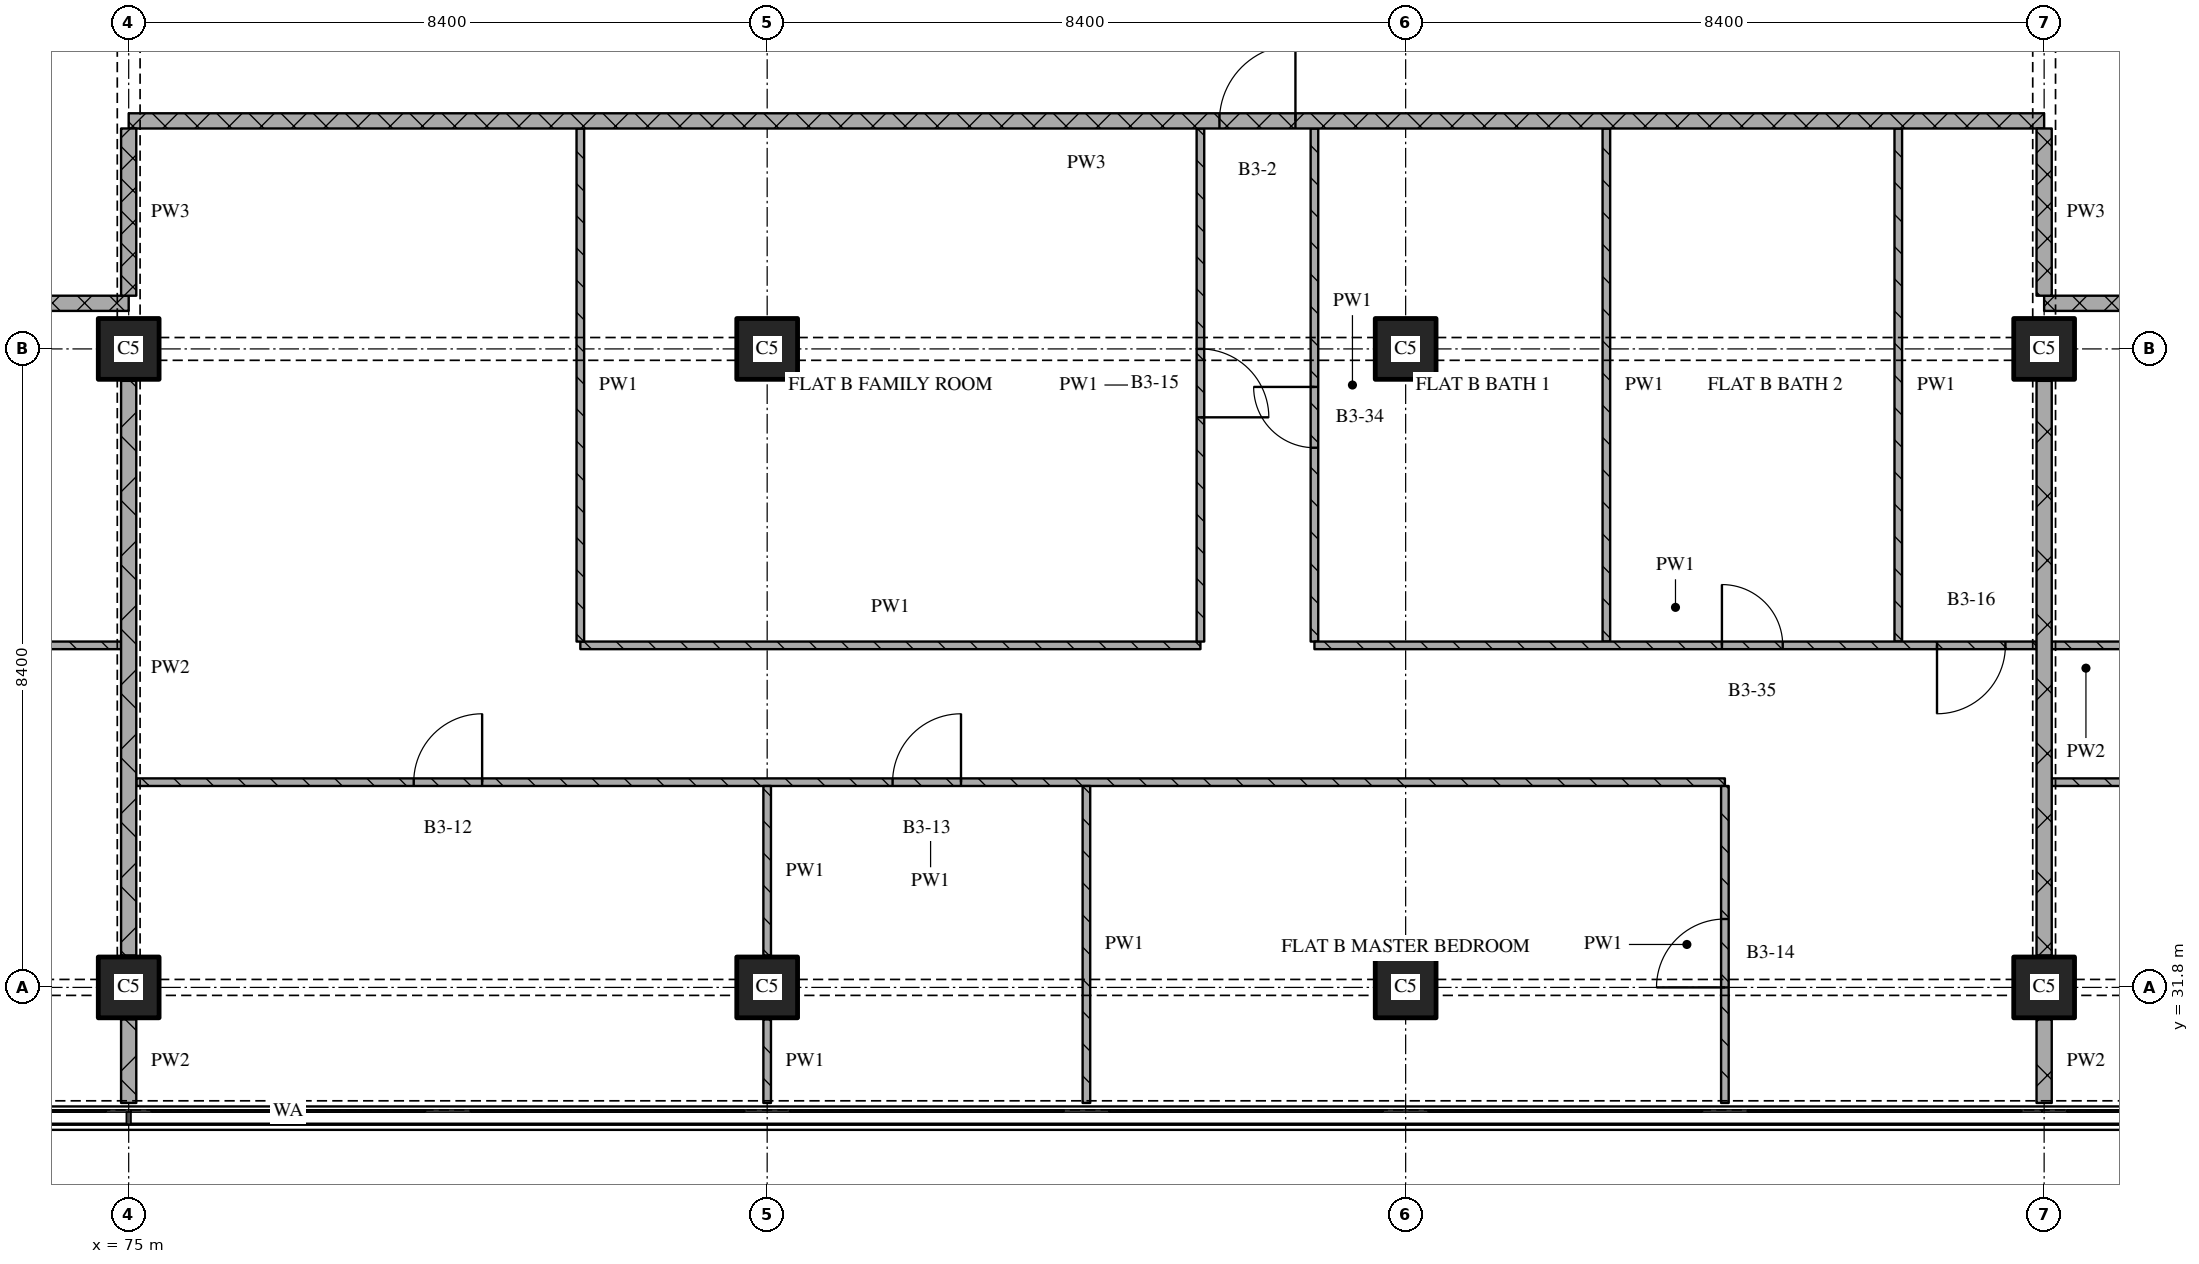
"""IFC4 building model, lengths in metres.
Left out: names, types, materials, properties, quantities, classifications, styles, units other than length and angle.
Written with IfcOpenShell. Run it as: python <this file> out.ifc"""

import sys

from ifc_helpers import new_model, si_unit, direction, frame, frame_2d, origin, origin_2d, place, context, subcontext, project, spatial, rectangle, extrude, element, fill, save


model = new_model("IFC4")
c1 = context("Model", 3, precision=1e-05, world=origin(), true_north=direction((0.0, 1.0)))
c2 = subcontext(c1, "Body", "Model", "MODEL_VIEW")
j1 = project(units=[si_unit("LENGTHUNIT", "METRE"), si_unit("PLANEANGLEUNIT", "RADIAN")], contexts=[c1])
p1 = place(None, origin())
s1 = spatial("IfcSite", under=j1, at=p1, CompositionType="ELEMENT")
p2 = place(p1, origin())
s2 = spatial("IfcBuilding", under=s1, at=p2, CompositionType="ELEMENT")
p3 = place(p2, frame((0.0, 0.0, 120.45)))
s3 = spatial("IfcBuildingStorey", under=s2, at=p3, CompositionType="ELEMENT", Elevation=120.45)
for number, where, z_axis, x_axis in (
    (1, (75.0, 31.8, 0.0), (0.0, 0.0, 1.0), (1.0, 0.0, 0.0)),
    (2, (75.0, 40.2, 0.0), (0.0, 0.0, 1.0), (1.0, 0.0, 0.0)),
    (3, (83.4, 31.8, 0.0), (0.0, 0.0, 1.0), (1.0, 0.0, 0.0)),
    (4, (83.4, 40.2, 0.0), (0.0, 0.0, 1.0), (1.0, 0.0, 0.0)),
    (5, (91.8, 31.8, 0.0), (0.0, 0.0, 1.0), (1.0, 0.0, 0.0)),
    (6, (91.8, 40.2, 0.0), (0.0, 0.0, 1.0), (1.0, 0.0, 0.0)),
    (7, (100.2, 31.8, 0.0), (0.0, 0.0, 1.0), (1.0, 0.0, 0.0)),
    (8, (100.2, 40.2, 0.0), (0.0, 0.0, 1.0), (1.0, 0.0, 0.0)),
):
    element("IfcColumn", number, at=place(p3, frame(where, z_axis=z_axis, x_axis=x_axis)), inside=s3, PredefinedType="COLUMN", context=c2, shape_type="SweptSolid", body=[
        extrude(rectangle(XDim=0.8, YDim=0.8, at=origin_2d()), origin(), (0.0, 0.0, 1.0), 3.6),
    ])
p4 = place(p3, frame((96.0, 34.5, 0.0), z_axis=(0.0, 0.0, 1.0), x_axis=(-1.0, 0.0, 0.0)))
e9 = element("IfcWall", 9, at=p4, inside=s3, PredefinedType="PARTITIONING", context=c2, shape_type="SweptSolid", body=[
    extrude(rectangle(XDim=20.9, YDim=0.1, at=frame_2d((10.45, 0.0))), origin(), (0.0, 0.0, 1.0), 3.32),
])
p5 = place(p4, frame((10.05, 0.0, 0.0)))
e10 = element("IfcOpeningElement", 10, at=p5, cuts=e9, PredefinedType="OPENING", context=c2, shape_type="SweptSolid", body=[
    extrude(rectangle(XDim=0.9, YDim=2.1, at=frame_2d((0.45, 1.05))), frame((0.0, 0.06, 0.0), z_axis=(0.0, -1.0, 0.0), x_axis=(1.0, 0.0, 0.0)), (0.0, 0.0, 1.0), 0.12),
])
p6 = place(p4, frame((16.35, 0.0, 0.0)))
e11 = element("IfcOpeningElement", 11, at=p6, cuts=e9, PredefinedType="OPENING", context=c2, shape_type="SweptSolid", body=[
    extrude(rectangle(XDim=0.9, YDim=2.1, at=frame_2d((0.45, 1.05))), frame((0.0, 0.06, 0.0), z_axis=(0.0, -1.0, 0.0), x_axis=(1.0, 0.0, 0.0)), (0.0, 0.0, 1.0), 0.12),
])
p7 = place(p3, frame((112.8, 34.5, 0.0), z_axis=(0.0, 0.0, 1.0), x_axis=(-1.0, 0.0, 0.0)))
e12 = element("IfcWall", 12, at=p7, inside=s3, PredefinedType="PARTITIONING", context=c2, shape_type="SweptSolid", body=[
    extrude(rectangle(XDim=12.5, YDim=0.1, at=frame_2d((6.25, 0.0))), origin(), (0.0, 0.0, 1.0), 3.32),
])
p8 = place(p7, frame((7.95, 0.0, 0.0)))
e13 = element("IfcOpeningElement", 13, at=p8, cuts=e12, PredefinedType="OPENING", context=c2, shape_type="SweptSolid", body=[
    extrude(rectangle(XDim=0.9, YDim=2.1, at=frame_2d((0.45, 1.05))), frame((0.0, 0.06, 0.0), z_axis=(0.0, -1.0, 0.0), x_axis=(1.0, 0.0, 0.0)), (0.0, 0.0, 1.0), 0.12),
])
p9 = place(p3, frame((64.8, 36.3, 0.0), z_axis=(0.0, 0.0, 1.0), x_axis=(1.0, 0.0, 0.0)))
e14 = element("IfcWall", 14, at=p9, inside=s3, PredefinedType="PARTITIONING", context=c2, shape_type="SweptSolid", body=[
    extrude(rectangle(XDim=10.1, YDim=0.1, at=frame_2d((5.05, 0.0))), origin(), (0.0, 0.0, 1.0), 3.32),
])
p10 = place(p9, frame((6.95, 0.0, 0.0)))
e15 = element("IfcOpeningElement", 15, at=p10, cuts=e14, PredefinedType="OPENING", context=c2, shape_type="SweptSolid", body=[
    extrude(rectangle(XDim=0.8, YDim=2.1, at=frame_2d((0.4, 1.05))), frame((0.0, 0.06, 0.0), z_axis=(0.0, -1.0, 0.0), x_axis=(1.0, 0.0, 0.0)), (0.0, 0.0, 1.0), 0.12),
])
p11 = place(p3, frame((80.942, 36.3, 0.0), z_axis=(0.0, 0.0, 1.0), x_axis=(1.0, 0.0, 0.0)))
e16 = element("IfcWall", 16, at=p11, inside=s3, PredefinedType="PARTITIONING", context=c2, shape_type="SweptSolid", body=[
    extrude(rectangle(XDim=8.158, YDim=0.1, at=frame_2d((4.079, 0.0))), origin(), (0.0, 0.0, 1.0), 3.32),
])
p12 = place(p3, frame((75.0, 40.8, 0.0), z_axis=(0.0, 0.0, 1.0), x_axis=(-1.0, 0.0, 0.0)))
e17 = element("IfcWall", 17, at=p12, inside=s3, PredefinedType="PARTITIONING", context=c2, shape_type="SweptSolid", body=[
    extrude(rectangle(XDim=24.18, YDim=0.2, at=frame_2d((12.09, 0.0))), origin(), (0.0, 0.0, 1.0), 3.32),
])
p13 = place(p12, frame((10.45, 0.0, 0.0)))
e18 = element("IfcOpeningElement", 18, at=p13, cuts=e17, PredefinedType="OPENING", context=c2, shape_type="SweptSolid", body=[
    extrude(rectangle(XDim=1.0, YDim=2.1, at=frame_2d((0.5, 1.05))), frame((0.0, 0.11, 0.0), z_axis=(0.0, -1.0, 0.0), x_axis=(1.0, 0.0, 0.0)), (0.0, 0.0, 1.0), 0.22),
])
p14 = place(p3, frame((124.38, 40.8, 0.0), z_axis=(0.0, 0.0, 1.0), x_axis=(-1.0, 0.0, 0.0)))
e19 = element("IfcWall", 19, at=p14, inside=s3, PredefinedType="PARTITIONING", context=c2, shape_type="SweptSolid", body=[
    extrude(rectangle(XDim=24.18, YDim=0.2, at=frame_2d((12.09, 0.0))), origin(), (0.0, 0.0, 1.0), 3.32),
])
p15 = place(p14, frame((16.33, 0.0, 0.0)))
e20 = element("IfcOpeningElement", 20, at=p15, cuts=e19, PredefinedType="OPENING", context=c2, shape_type="SweptSolid", body=[
    extrude(rectangle(XDim=1.0, YDim=2.1, at=frame_2d((0.5, 1.05))), frame((0.0, 0.11, 0.0), z_axis=(0.0, -1.0, 0.0), x_axis=(1.0, 0.0, 0.0)), (0.0, 0.0, 1.0), 0.22),
])
p16 = place(p3, frame((100.2, 43.2, 0.0), z_axis=(0.0, 0.0, 1.0), x_axis=(-1.0, 0.0, 0.0)))
e21 = element("IfcWall", 21, at=p16, inside=s3, PredefinedType="PARTITIONING", context=c2, shape_type="SweptSolid", body=[
    extrude(rectangle(XDim=25.2, YDim=0.2, at=frame_2d((12.6, 0.0))), origin(), (0.0, 0.0, 1.0), 3.32),
])
p17 = place(p16, frame((9.85, 0.0, 0.0)))
e22 = element("IfcOpeningElement", 22, at=p17, cuts=e21, PredefinedType="OPENING", context=c2, shape_type="SweptSolid", body=[
    extrude(rectangle(XDim=1.0, YDim=2.1, at=frame_2d((0.5, 1.05))), frame((0.0, 0.11, 0.0), z_axis=(0.0, -1.0, 0.0), x_axis=(1.0, 0.0, 0.0)), (0.0, 0.0, 1.0), 0.22),
])
p18 = place(p3, frame((75.0, 43.1, 0.0), z_axis=(0.0, 0.0, 1.0), x_axis=(0.0, -1.0, 0.0)))
e23 = element("IfcWall", 23, at=p18, inside=s3, PredefinedType="PARTITIONING", context=c2, shape_type="SweptSolid", body=[
    extrude(rectangle(XDim=2.2, YDim=0.2, at=frame_2d((1.1, 0.0))), origin(), (0.0, 0.0, 1.0), 2.43),
])
p19 = place(p3, frame((75.0, 31.38, 0.0), z_axis=(0.0, 0.0, 1.0), x_axis=(0.0, -1.0, 0.0)))
e24 = element("IfcWall", 24, at=p19, inside=s3, PredefinedType="PARTITIONING", context=c2, shape_type="SweptSolid", body=[
    extrude(rectangle(XDim=1.1, YDim=0.2, at=frame_2d((0.55, 0.0))), origin(), (0.0, 0.0, 1.0), 3.32),
])
p20 = place(p3, frame((75.0, 39.78, 0.0), z_axis=(0.0, 0.0, 1.0), x_axis=(0.0, -1.0, 0.0)))
e25 = element("IfcWall", 25, at=p20, inside=s3, PredefinedType="PARTITIONING", context=c2, shape_type="SweptSolid", body=[
    extrude(rectangle(XDim=7.56, YDim=0.2, at=frame_2d((3.78, 0.0))), origin(), (0.0, 0.0, 1.0), 2.83),
])
p21 = place(p3, frame((80.942, 43.1, 0.0), z_axis=(0.0, 0.0, 1.0), x_axis=(0.0, -1.0, 0.0)))
e26 = element("IfcWall", 26, at=p21, inside=s3, PredefinedType="PARTITIONING", context=c2, shape_type="SweptSolid", body=[
    extrude(rectangle(XDim=6.75, YDim=0.1, at=frame_2d((3.375, 0.0))), origin(), (0.0, 0.0, 1.0), 3.32),
])
p22 = place(p3, frame((83.4, 31.38, 0.0), z_axis=(0.0, 0.0, 1.0), x_axis=(0.0, -1.0, 0.0)))
e27 = element("IfcWall", 27, at=p22, inside=s3, PredefinedType="PARTITIONING", context=c2, shape_type="SweptSolid", body=[
    extrude(rectangle(XDim=1.1, YDim=0.1, at=frame_2d((0.55, 0.0))), origin(), (0.0, 0.0, 1.0), 3.32),
])
p23 = place(p3, frame((83.4, 34.45, 0.0), z_axis=(0.0, 0.0, 1.0), x_axis=(0.0, -1.0, 0.0)))
e28 = element("IfcWall", 28, at=p23, inside=s3, PredefinedType="PARTITIONING", context=c2, shape_type="SweptSolid", body=[
    extrude(rectangle(XDim=2.23, YDim=0.1, at=frame_2d((1.115, 0.0))), origin(), (0.0, 0.0, 1.0), 3.32),
])
p24 = place(p3, frame((87.6, 34.45, 0.0), z_axis=(0.0, 0.0, 1.0), x_axis=(0.0, -1.0, 0.0)))
e29 = element("IfcWall", 29, at=p24, inside=s3, PredefinedType="PARTITIONING", context=c2, shape_type="SweptSolid", body=[
    extrude(rectangle(XDim=4.17, YDim=0.1, at=frame_2d((2.085, 0.0))), origin(), (0.0, 0.0, 1.0), 3.32),
])
p25 = place(p3, frame((89.1, 36.35, 0.0), z_axis=(0.0, 0.0, 1.0), x_axis=(0.0, 1.0, 0.0)))
e30 = element("IfcWall", 30, at=p25, inside=s3, PredefinedType="PARTITIONING", context=c2, shape_type="SweptSolid", body=[
    extrude(rectangle(XDim=6.75, YDim=0.1, at=frame_2d((3.375, 0.0))), origin(), (0.0, 0.0, 1.0), 3.32),
])
p26 = place(p25, frame((2.95, 0.0, 0.0)))
e31 = element("IfcOpeningElement", 31, at=p26, cuts=e30, PredefinedType="OPENING", context=c2, shape_type="SweptSolid", body=[
    extrude(rectangle(XDim=0.9, YDim=2.1, at=frame_2d((0.45, 1.05))), frame((0.0, 0.06, 0.0), z_axis=(0.0, -1.0, 0.0), x_axis=(1.0, 0.0, 0.0)), (0.0, 0.0, 1.0), 0.12),
])
p27 = place(p3, frame((90.6, 43.1, 0.0), z_axis=(0.0, 0.0, 1.0), x_axis=(0.0, -1.0, 0.0)))
e32 = element("IfcWall", 32, at=p27, inside=s3, PredefinedType="PARTITIONING", context=c2, shape_type="SweptSolid", body=[
    extrude(rectangle(XDim=6.75, YDim=0.1, at=frame_2d((3.375, 0.0))), origin(), (0.0, 0.0, 1.0), 3.32),
])
p28 = place(p27, frame((3.4, 0.0, 0.0)))
e33 = element("IfcOpeningElement", 33, at=p28, cuts=e32, PredefinedType="OPENING", context=c2, shape_type="SweptSolid", body=[
    extrude(rectangle(XDim=0.8, YDim=2.1, at=frame_2d((0.4, 1.05))), frame((0.0, 0.06, 0.0), z_axis=(0.0, -1.0, 0.0), x_axis=(1.0, 0.0, 0.0)), (0.0, 0.0, 1.0), 0.12),
])
p29 = place(p3, frame((94.441, 43.1, 0.0), z_axis=(0.0, 0.0, 1.0), x_axis=(0.0, -1.0, 0.0)))
e34 = element("IfcWall", 34, at=p29, inside=s3, PredefinedType="PARTITIONING", context=c2, shape_type="SweptSolid", body=[
    extrude(rectangle(XDim=6.75, YDim=0.1, at=frame_2d((3.375, 0.0))), origin(), (0.0, 0.0, 1.0), 3.32),
])
p30 = place(p3, frame((96.0, 30.28, 0.0), z_axis=(0.0, 0.0, 1.0), x_axis=(0.0, 1.0, 0.0)))
e35 = element("IfcWall", 35, at=p30, inside=s3, PredefinedType="PARTITIONING", context=c2, shape_type="SweptSolid", body=[
    extrude(rectangle(XDim=4.17, YDim=0.1, at=frame_2d((2.085, 0.0))), origin(), (0.0, 0.0, 1.0), 3.32),
])
p31 = place(p30, frame((1.52, 0.0, 0.0)))
e36 = element("IfcOpeningElement", 36, at=p31, cuts=e35, PredefinedType="OPENING", context=c2, shape_type="SweptSolid", body=[
    extrude(rectangle(XDim=0.9, YDim=2.1, at=frame_2d((0.45, 1.05))), frame((0.0, 0.06, 0.0), z_axis=(0.0, -1.0, 0.0), x_axis=(1.0, 0.0, 0.0)), (0.0, 0.0, 1.0), 0.12),
])
p32 = place(p3, frame((98.281, 43.1, 0.0), z_axis=(0.0, 0.0, 1.0), x_axis=(0.0, -1.0, 0.0)))
e37 = element("IfcWall", 37, at=p32, inside=s3, PredefinedType="PARTITIONING", context=c2, shape_type="SweptSolid", body=[
    extrude(rectangle(XDim=6.75, YDim=0.1, at=frame_2d((3.375, 0.0))), origin(), (0.0, 0.0, 1.0), 3.32),
])
p33 = place(p3, frame((100.2, 43.1, 0.0), z_axis=(0.0, 0.0, 1.0), x_axis=(0.0, -1.0, 0.0)))
e38 = element("IfcWall", 38, at=p33, inside=s3, PredefinedType="PARTITIONING", context=c2, shape_type="SweptSolid", body=[
    extrude(rectangle(XDim=2.2, YDim=0.2, at=frame_2d((1.1, 0.0))), origin(), (0.0, 0.0, 1.0), 2.43),
])
p34 = place(p3, frame((100.2, 31.38, 0.0), z_axis=(0.0, 0.0, 1.0), x_axis=(0.0, -1.0, 0.0)))
e39 = element("IfcWall", 39, at=p34, inside=s3, PredefinedType="PARTITIONING", context=c2, shape_type="SweptSolid", body=[
    extrude(rectangle(XDim=1.1, YDim=0.2, at=frame_2d((0.55, 0.0))), origin(), (0.0, 0.0, 1.0), 3.32),
])
p35 = place(p3, frame((100.2, 39.78, 0.0), z_axis=(0.0, 0.0, 1.0), x_axis=(0.0, -1.0, 0.0)))
e40 = element("IfcWall", 40, at=p35, inside=s3, PredefinedType="PARTITIONING", context=c2, shape_type="SweptSolid", body=[
    extrude(rectangle(XDim=7.56, YDim=0.2, at=frame_2d((3.78, 0.0))), origin(), (0.0, 0.0, 1.0), 2.83),
])
p36 = place(p3, frame((90.6, 36.3, 0.0), z_axis=(0.0, 0.0, 1.0), x_axis=(1.0, 0.0, 0.0)))
e41 = element("IfcWall", 41, at=p36, inside=s3, PredefinedType="PARTITIONING", context=c2, shape_type="SweptSolid", body=[
    extrude(rectangle(XDim=9.5, YDim=0.1, at=frame_2d((4.75, 0.0))), origin(), (0.0, 0.0, 1.0), 3.32),
])
p37 = place(p36, frame((5.361, 0.0, 0.0)))
e42 = element("IfcOpeningElement", 42, at=p37, cuts=e41, PredefinedType="OPENING", context=c2, shape_type="SweptSolid", body=[
    extrude(rectangle(XDim=0.8, YDim=2.1, at=frame_2d((0.4, 1.05))), frame((0.0, 0.06, 0.0), z_axis=(0.0, -1.0, 0.0), x_axis=(1.0, 0.0, 0.0)), (0.0, 0.0, 1.0), 0.12),
])
p38 = place(p36, frame((8.191, 0.0, 0.0)))
e43 = element("IfcOpeningElement", 43, at=p38, cuts=e41, PredefinedType="OPENING", context=c2, shape_type="SweptSolid", body=[
    extrude(rectangle(XDim=0.9, YDim=2.1, at=frame_2d((0.45, 1.05))), frame((0.0, 0.06, 0.0), z_axis=(0.0, -1.0, 0.0), x_axis=(1.0, 0.0, 0.0)), (0.0, 0.0, 1.0), 0.12),
])
p39 = place(p3, frame((100.3, 36.3, 0.0), z_axis=(0.0, 0.0, 1.0), x_axis=(1.0, 0.0, 0.0)))
e44 = element("IfcWall", 44, at=p39, inside=s3, PredefinedType="PARTITIONING", context=c2, shape_type="SweptSolid", body=[
    extrude(rectangle(XDim=6.5, YDim=0.1, at=frame_2d((3.25, 0.0))), origin(), (0.0, 0.0, 1.0), 3.32),
])
p40 = place(p39, frame((1.75, 0.0, 0.0)))
e45 = element("IfcOpeningElement", 45, at=p40, cuts=e44, PredefinedType="OPENING", context=c2, shape_type="SweptSolid", body=[
    extrude(rectangle(XDim=0.8, YDim=2.1, at=frame_2d((0.4, 1.05))), frame((0.0, 0.06, 0.0), z_axis=(0.0, -1.0, 0.0), x_axis=(1.0, 0.0, 0.0)), (0.0, 0.0, 1.0), 0.12),
])
p41 = place(p5, origin())
e46 = element("IfcDoor", 46, at=p41, inside=s3, OperationType="SINGLE_SWING_RIGHT", PredefinedType="DOOR", context=c2, shape_type="SweptSolid", body=[
    extrude(rectangle(XDim=0.9, YDim=2.1, at=frame_2d((0.45, 1.05))), frame((0.0, 0.025, 0.0), z_axis=(0.0, -1.0, 0.0), x_axis=(1.0, 0.0, 0.0)), (0.0, 0.0, 1.0), 0.05),
])
fill(e10, e46)
p42 = place(p6, origin())
e47 = element("IfcDoor", 47, at=p42, inside=s3, OperationType="SINGLE_SWING_RIGHT", PredefinedType="DOOR", context=c2, shape_type="SweptSolid", body=[
    extrude(rectangle(XDim=0.9, YDim=2.1, at=frame_2d((0.45, 1.05))), frame((0.0, 0.025, 0.0), z_axis=(0.0, -1.0, 0.0), x_axis=(1.0, 0.0, 0.0)), (0.0, 0.0, 1.0), 0.05),
])
fill(e11, e47)
p43 = place(p17, origin())
e48 = element("IfcDoor", 48, at=p43, inside=s3, OperationType="SINGLE_SWING_RIGHT", PredefinedType="DOOR", context=c2, shape_type="SweptSolid", body=[
    extrude(rectangle(XDim=1.0, YDim=2.1, at=frame_2d((0.5, 1.05))), frame((0.0, 0.025, 0.0), z_axis=(0.0, -1.0, 0.0), x_axis=(1.0, 0.0, 0.0)), (0.0, 0.0, 1.0), 0.05),
])
fill(e22, e48)
p44 = place(p26, origin())
e49 = element("IfcDoor", 49, at=p44, inside=s3, OperationType="SINGLE_SWING_RIGHT", PredefinedType="DOOR", context=c2, shape_type="SweptSolid", body=[
    extrude(rectangle(XDim=0.9, YDim=2.1, at=frame_2d((0.45, 1.05))), frame((0.0, 0.025, 0.0), z_axis=(0.0, -1.0, 0.0), x_axis=(1.0, 0.0, 0.0)), (0.0, 0.0, 1.0), 0.05),
])
fill(e31, e49)
p45 = place(p28, origin())
e50 = element("IfcDoor", 50, at=p45, inside=s3, OperationType="SINGLE_SWING_RIGHT", PredefinedType="DOOR", context=c2, shape_type="SweptSolid", body=[
    extrude(rectangle(XDim=0.8, YDim=2.1, at=frame_2d((0.4, 1.05))), frame((0.0, 0.025, 0.0), z_axis=(0.0, -1.0, 0.0), x_axis=(1.0, 0.0, 0.0)), (0.0, 0.0, 1.0), 0.05),
])
fill(e33, e50)
p46 = place(p31, origin())
e51 = element("IfcDoor", 51, at=p46, inside=s3, OperationType="SINGLE_SWING_LEFT", PredefinedType="DOOR", context=c2, shape_type="SweptSolid", body=[
    extrude(rectangle(XDim=0.9, YDim=2.1, at=frame_2d((0.45, 1.05))), frame((0.0, 0.025, 0.0), z_axis=(0.0, -1.0, 0.0), x_axis=(1.0, 0.0, 0.0)), (0.0, 0.0, 1.0), 0.05),
])
fill(e36, e51)
p47 = place(p37, origin())
e52 = element("IfcDoor", 52, at=p47, inside=s3, OperationType="SINGLE_SWING_LEFT", PredefinedType="DOOR", context=c2, shape_type="SweptSolid", body=[
    extrude(rectangle(XDim=0.8, YDim=2.1, at=frame_2d((0.4, 1.05))), frame((0.0, 0.025, 0.0), z_axis=(0.0, -1.0, 0.0), x_axis=(1.0, 0.0, 0.0)), (0.0, 0.0, 1.0), 0.05),
])
fill(e42, e52)
p48 = place(p38, origin())
e53 = element("IfcDoor", 53, at=p48, inside=s3, OperationType="SINGLE_SWING_RIGHT", PredefinedType="DOOR", context=c2, shape_type="SweptSolid", body=[
    extrude(rectangle(XDim=0.9, YDim=2.1, at=frame_2d((0.45, 1.05))), frame((0.0, 0.025, 0.0), z_axis=(0.0, -1.0, 0.0), x_axis=(1.0, 0.0, 0.0)), (0.0, 0.0, 1.0), 0.05),
])
fill(e43, e53)
save(model, sys.argv[1])
